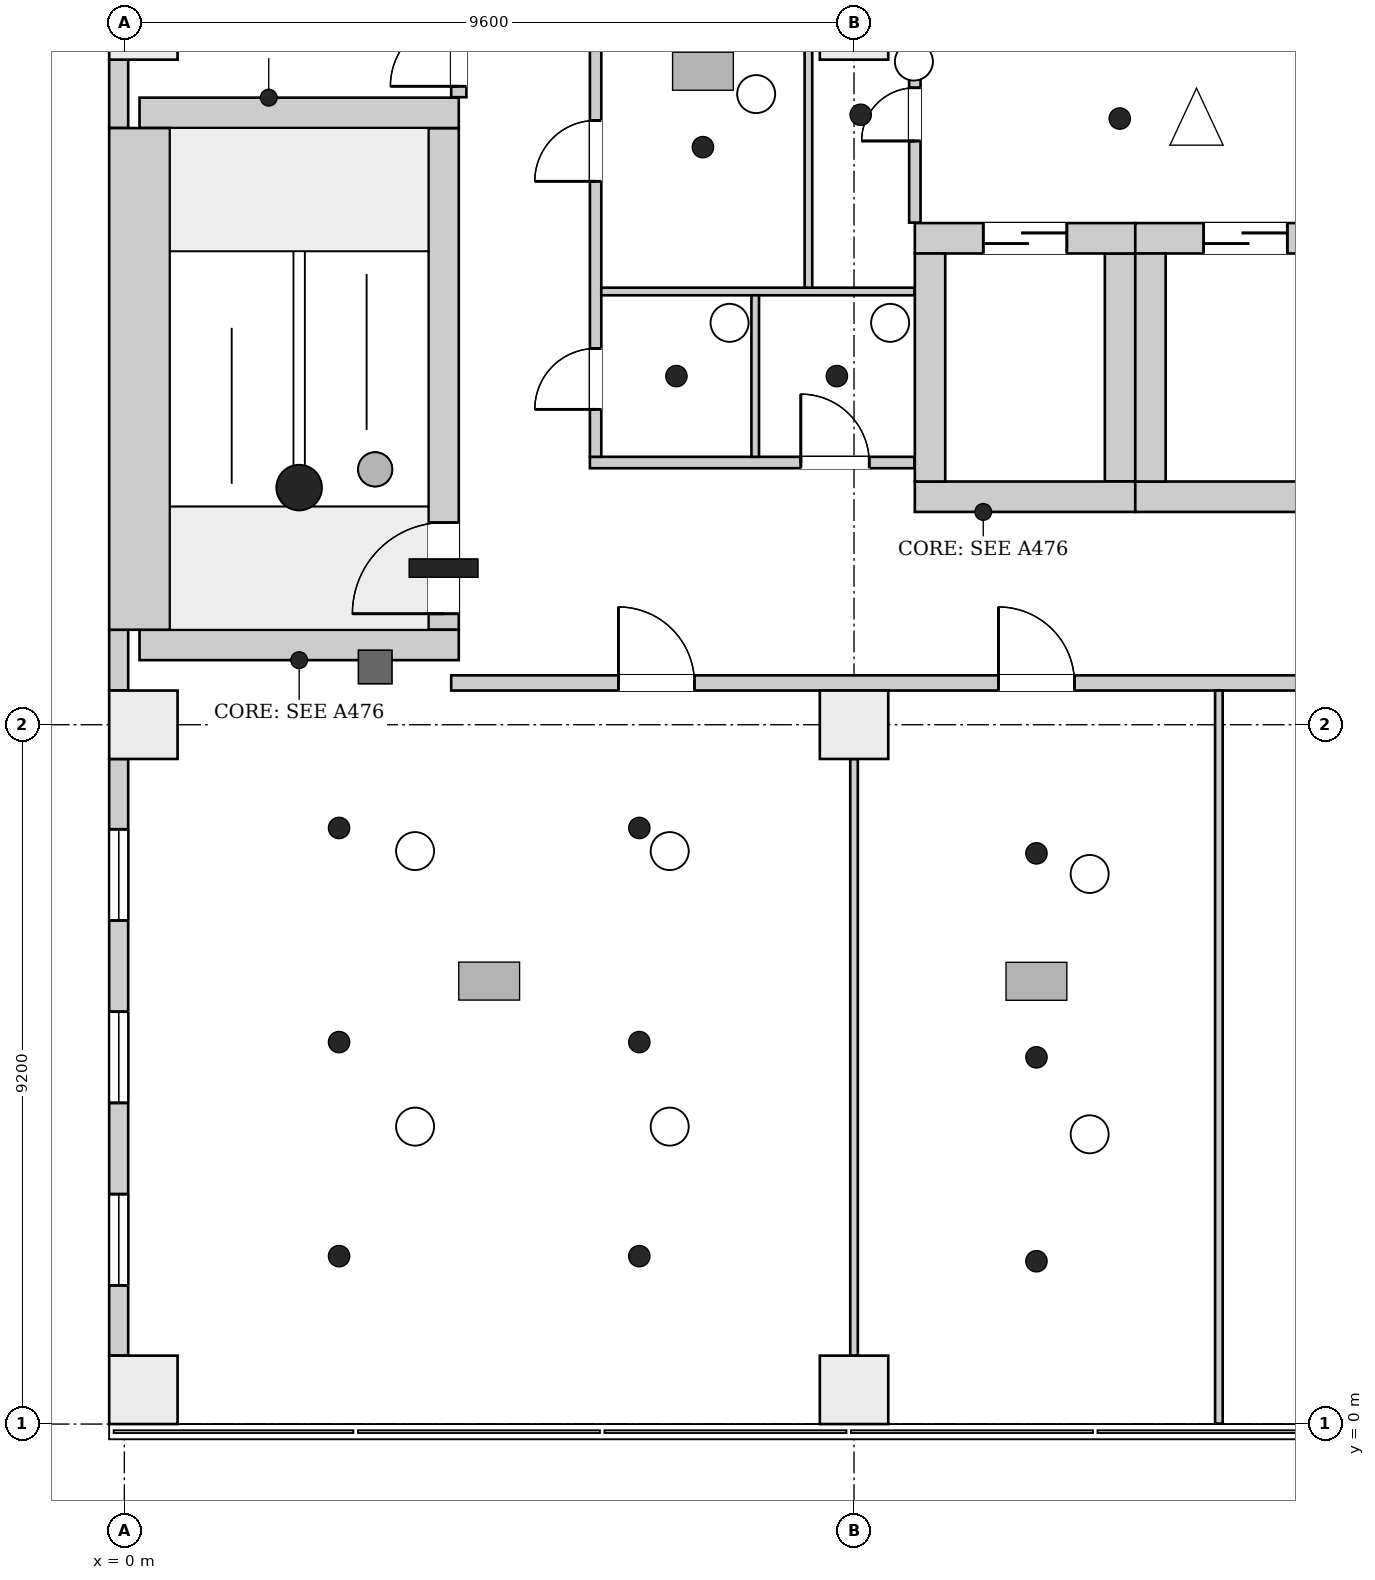
"""IFC4 building model, lengths in metres.
Left out: names, types, materials, properties, quantities, classifications, styles, units other than length and angle.
Written with IfcOpenShell. Run it as: python <this file> out.ifc"""

import sys

from ifc_helpers import new_model, si_unit, direction, frame, frame_2d, origin, origin_2d, place, context, subcontext, project, spatial, rectangle, extrude, element, fill, save


model = new_model("IFC4")
c1 = context("Model", 3, precision=1e-05, world=origin(), true_north=direction((0.0, 1.0)))
c2 = subcontext(c1, "Body", "Model", "MODEL_VIEW")
j1 = project(units=[si_unit("LENGTHUNIT", "METRE"), si_unit("PLANEANGLEUNIT", "RADIAN")], contexts=[c1])
p1 = place(None, origin())
s1 = spatial("IfcSite", under=j1, at=p1, CompositionType="ELEMENT")
p2 = place(p1, origin())
s2 = spatial("IfcBuilding", under=s1, at=p2, CompositionType="ELEMENT")
p3 = place(p2, frame((0.0, 0.0, 52.9)))
s3 = spatial("IfcBuildingStorey", under=s2, at=p3, CompositionType="ELEMENT", Elevation=52.9)
for number, where, z_axis, x_axis in (
    (1, (0.2, 10.25, 0.0), (0.0, 0.0, 1.0), (1.0, 0.0, 0.0)),
    (2, (0.2, 17.25, 0.0), (0.0, 0.0, 1.0), (1.0, 0.0, 0.0)),
):
    element("IfcWall", number, at=place(p3, frame(where, z_axis=z_axis, x_axis=x_axis)), inside=s3, PredefinedType="SHEAR", context=c2, shape_type="SweptSolid", body=[
        extrude(rectangle(XDim=4.2, YDim=0.4, at=frame_2d((2.1, 0.0))), origin(), (0.0, 0.0, 1.0), 4.2),
    ])
p4 = place(p3, frame((0.2, 10.45, 0.0), z_axis=(0.0, 0.0, 1.0), x_axis=(0.0, 1.0, 0.0)))
e3 = element("IfcWall", 3, at=p4, inside=s3, PredefinedType="SHEAR", context=c2, shape_type="SweptSolid", body=[
    extrude(rectangle(XDim=6.6, YDim=0.8, at=frame_2d((3.3, 0.0))), origin(), (0.0, 0.0, 1.0), 4.2),
])
p5 = place(p3, frame((4.2, 10.45, 0.0), z_axis=(0.0, 0.0, 1.0), x_axis=(0.0, 1.0, 0.0)))
e4 = element("IfcWall", 4, at=p5, inside=s3, PredefinedType="SHEAR", context=c2, shape_type="SweptSolid", body=[
    extrude(rectangle(XDim=6.6, YDim=0.4, at=frame_2d((3.3, 0.0))), origin(), (0.0, 0.0, 1.0), 4.2),
])
p6 = place(p5, frame((0.21, 0.0, 0.0)))
e5 = element("IfcOpeningElement", 5, at=p6, cuts=e4, PredefinedType="OPENING", context=c2, shape_type="SweptSolid", body=[
    extrude(rectangle(XDim=1.2, YDim=2.1, at=frame_2d((0.6, 1.05))), frame((0.0, 0.21, 0.0), z_axis=(0.0, -1.0, 0.0), x_axis=(1.0, 0.0, 0.0)), (0.0, 0.0, 1.0), 0.42),
])
p7 = place(p3, frame((10.4, 12.2, 0.0), z_axis=(0.0, 0.0, 1.0), x_axis=(1.0, 0.0, 0.0)))
e6 = element("IfcWall", 6, at=p7, inside=s3, PredefinedType="SHEAR", context=c2, shape_type="SweptSolid", body=[
    extrude(rectangle(XDim=2.9, YDim=0.4, at=frame_2d((1.45, 0.0))), origin(), (0.0, 0.0, 1.0), 4.2),
])
p8 = place(p3, frame((10.4, 15.6, 0.0), z_axis=(0.0, 0.0, 1.0), x_axis=(1.0, 0.0, 0.0)))
e7 = element("IfcWall", 7, at=p8, inside=s3, PredefinedType="SHEAR", context=c2, shape_type="SweptSolid", body=[
    extrude(rectangle(XDim=2.9, YDim=0.4, at=frame_2d((1.45, 0.0))), origin(), (0.0, 0.0, 1.0), 4.2),
])
p9 = place(p8, frame((0.9, 0.0, 0.0)))
e8 = element("IfcOpeningElement", 8, at=p9, cuts=e7, PredefinedType="OPENING", context=c2, shape_type="SweptSolid", body=[
    extrude(rectangle(XDim=1.1, YDim=2.1, at=frame_2d((0.55, 1.05))), frame((0.0, 0.21, 0.0), z_axis=(0.0, -1.0, 0.0), x_axis=(1.0, 0.0, 0.0)), (0.0, 0.0, 1.0), 0.42),
])
for number, where, z_axis, x_axis in (
    (9, (10.6, 12.4, 0.0), (0.0, 0.0, 1.0), (0.0, 1.0, 0.0)),
    (10, (13.1, 12.4, 0.0), (0.0, 0.0, 1.0), (0.0, 1.0, 0.0)),
):
    element("IfcWall", number, at=place(p3, frame(where, z_axis=z_axis, x_axis=x_axis)), inside=s3, PredefinedType="SHEAR", context=c2, shape_type="SweptSolid", body=[
        extrude(rectangle(XDim=3.0, YDim=0.4, at=frame_2d((1.5, 0.0))), origin(), (0.0, 0.0, 1.0), 4.2),
    ])
p10 = place(p3, frame((13.3, 12.2, 0.0), z_axis=(0.0, 0.0, 1.0), x_axis=(1.0, 0.0, 0.0)))
e11 = element("IfcWall", 11, at=p10, inside=s3, PredefinedType="SHEAR", context=c2, shape_type="SweptSolid", body=[
    extrude(rectangle(XDim=2.9, YDim=0.4, at=frame_2d((1.45, 0.0))), origin(), (0.0, 0.0, 1.0), 4.2),
])
p11 = place(p3, frame((13.3, 15.6, 0.0), z_axis=(0.0, 0.0, 1.0), x_axis=(1.0, 0.0, 0.0)))
e12 = element("IfcWall", 12, at=p11, inside=s3, PredefinedType="SHEAR", context=c2, shape_type="SweptSolid", body=[
    extrude(rectangle(XDim=2.9, YDim=0.4, at=frame_2d((1.45, 0.0))), origin(), (0.0, 0.0, 1.0), 4.2),
])
p12 = place(p11, frame((0.9, 0.0, 0.0)))
e13 = element("IfcOpeningElement", 13, at=p12, cuts=e12, PredefinedType="OPENING", context=c2, shape_type="SweptSolid", body=[
    extrude(rectangle(XDim=1.1, YDim=2.1, at=frame_2d((0.55, 1.05))), frame((0.0, 0.21, 0.0), z_axis=(0.0, -1.0, 0.0), x_axis=(1.0, 0.0, 0.0)), (0.0, 0.0, 1.0), 0.42),
])
p13 = place(p3, frame((13.5, 12.4, 0.0), z_axis=(0.0, 0.0, 1.0), x_axis=(0.0, 1.0, 0.0)))
e14 = element("IfcWall", 14, at=p13, inside=s3, PredefinedType="SHEAR", context=c2, shape_type="SweptSolid", body=[
    extrude(rectangle(XDim=3.0, YDim=0.4, at=frame_2d((1.5, 0.0))), origin(), (0.0, 0.0, 1.0), 4.2),
])
for number, where, z_axis, x_axis in (
    (15, (0.25, 0.45, 0.0), (0.0, 0.0, 1.0), (1.0, 0.0, 0.0)),
    (16, (9.6, 0.45, 0.0), (0.0, 0.0, 1.0), (1.0, 0.0, 0.0)),
    (17, (0.25, 9.2, 0.0), (0.0, 0.0, 1.0), (1.0, 0.0, 0.0)),
    (18, (9.6, 9.2, 0.0), (0.0, 0.0, 1.0), (1.0, 0.0, 0.0)),
    (19, (0.25, 18.4, 0.0), (0.0, 0.0, 1.0), (1.0, 0.0, 0.0)),
    (20, (9.6, 18.4, 0.0), (0.0, 0.0, 1.0), (1.0, 0.0, 0.0)),
):
    element("IfcColumn", number, at=place(p3, frame(where, z_axis=z_axis, x_axis=x_axis)), inside=s3, PredefinedType="COLUMN", context=c2, shape_type="SweptSolid", body=[
        extrude(rectangle(XDim=0.9, YDim=0.9, at=origin_2d()), origin(), (0.0, 0.0, 1.0), 4.2),
    ])
p14 = place(p3, frame((-0.074, 8.75, 0.0), z_axis=(0.0, 0.0, 1.0), x_axis=(0.0, -1.0, 0.0)))
e21 = element("IfcWall", 21, at=p14, inside=s3, PredefinedType="ELEMENTEDWALL", context=c2, shape_type="SweptSolid", body=[
    extrude(rectangle(XDim=7.85, YDim=0.25, at=frame_2d((3.925, 0.0))), origin(), (0.0, 0.0, 1.0), 3.9),
])
p15 = place(p14, frame((5.725, 0.0, 0.9)))
e22 = element("IfcOpeningElement", 22, at=p15, cuts=e21, PredefinedType="OPENING", context=c2, shape_type="SweptSolid", body=[
    extrude(rectangle(XDim=1.2, YDim=2.6, at=frame_2d((0.6, 1.3))), frame((0.0, 0.135, 0.0), z_axis=(0.0, -1.0, 0.0), x_axis=(1.0, 0.0, 0.0)), (0.0, 0.0, 1.0), 0.27),
])
p16 = place(p14, frame((3.325, 0.0, 0.9)))
e23 = element("IfcOpeningElement", 23, at=p16, cuts=e21, PredefinedType="OPENING", context=c2, shape_type="SweptSolid", body=[
    extrude(rectangle(XDim=1.2, YDim=2.6, at=frame_2d((0.6, 1.3))), frame((0.0, 0.135, 0.0), z_axis=(0.0, -1.0, 0.0), x_axis=(1.0, 0.0, 0.0)), (0.0, 0.0, 1.0), 0.27),
])
p17 = place(p14, frame((0.925, 0.0, 0.9)))
e24 = element("IfcOpeningElement", 24, at=p17, cuts=e21, PredefinedType="OPENING", context=c2, shape_type="SweptSolid", body=[
    extrude(rectangle(XDim=1.2, YDim=2.6, at=frame_2d((0.6, 1.3))), frame((0.0, 0.135, 0.0), z_axis=(0.0, -1.0, 0.0), x_axis=(1.0, 0.0, 0.0)), (0.0, 0.0, 1.0), 0.27),
])
p18 = place(p3, frame((-0.074, 10.45, 0.0), z_axis=(0.0, 0.0, 1.0), x_axis=(0.0, -1.0, 0.0)))
e25 = element("IfcWall", 25, at=p18, inside=s3, PredefinedType="ELEMENTEDWALL", context=c2, shape_type="SweptSolid", body=[
    extrude(rectangle(XDim=0.8, YDim=0.25, at=frame_2d((0.4, 0.0))), origin(), (0.0, 0.0, 1.0), 3.9),
])
p19 = place(p3, frame((-0.074, 17.95, 0.0), z_axis=(0.0, 0.0, 1.0), x_axis=(0.0, -1.0, 0.0)))
e26 = element("IfcWall", 26, at=p19, inside=s3, PredefinedType="ELEMENTEDWALL", context=c2, shape_type="SweptSolid", body=[
    extrude(rectangle(XDim=0.9, YDim=0.25, at=frame_2d((0.45, 0.0))), origin(), (0.0, 0.0, 1.0), 3.9),
])
p20 = place(p3, frame((4.3, 9.75, 0.0), z_axis=(0.0, 0.0, 1.0), x_axis=(1.0, 0.0, 0.0)))
e27 = element("IfcWall", 27, at=p20, inside=s3, PredefinedType="PARTITIONING", context=c2, shape_type="SweptSolid", body=[
    extrude(rectangle(XDim=43.894, YDim=0.2, at=frame_2d((21.947, 0.0))), origin(), (0.0, 0.0, 1.0), 3.9),
])
p21 = place(p20, frame((2.2, 0.0, 0.0)))
e28 = element("IfcOpeningElement", 28, at=p21, cuts=e27, PredefinedType="OPENING", context=c2, shape_type="SweptSolid", body=[
    extrude(rectangle(XDim=1.0, YDim=2.1, at=frame_2d((0.5, 1.05))), frame((0.0, 0.11, 0.0), z_axis=(0.0, -1.0, 0.0), x_axis=(1.0, 0.0, 0.0)), (0.0, 0.0, 1.0), 0.22),
])
p22 = place(p20, frame((7.2, 0.0, 0.0)))
e29 = element("IfcOpeningElement", 29, at=p22, cuts=e27, PredefinedType="OPENING", context=c2, shape_type="SweptSolid", body=[
    extrude(rectangle(XDim=1.0, YDim=2.1, at=frame_2d((0.5, 1.05))), frame((0.0, 0.11, 0.0), z_axis=(0.0, -1.0, 0.0), x_axis=(1.0, 0.0, 0.0)), (0.0, 0.0, 1.0), 0.22),
])
p23 = place(p20, frame((16.8, 0.0, 0.0)))
e30 = element("IfcOpeningElement", 30, at=p23, cuts=e27, PredefinedType="OPENING", context=c2, shape_type="SweptSolid", body=[
    extrude(rectangle(XDim=1.0, YDim=2.1, at=frame_2d((0.5, 1.05))), frame((0.0, 0.11, 0.0), z_axis=(0.0, -1.0, 0.0), x_axis=(1.0, 0.0, 0.0)), (0.0, 0.0, 1.0), 0.22),
])
p24 = place(p20, frame((28.8, 0.0, 0.0)))
e31 = element("IfcOpeningElement", 31, at=p24, cuts=e27, PredefinedType="OPENING", context=c2, shape_type="SweptSolid", body=[
    extrude(rectangle(XDim=1.0, YDim=2.1, at=frame_2d((0.5, 1.05))), frame((0.0, 0.11, 0.0), z_axis=(0.0, -1.0, 0.0), x_axis=(1.0, 0.0, 0.0)), (0.0, 0.0, 1.0), 0.22),
])
p25 = place(p20, frame((38.25, 0.0, 0.0)))
e32 = element("IfcOpeningElement", 32, at=p25, cuts=e27, PredefinedType="OPENING", context=c2, shape_type="SweptSolid", body=[
    extrude(rectangle(XDim=1.5, YDim=2.1, at=frame_2d((0.75, 1.05))), frame((0.0, 0.11, 0.0), z_axis=(0.0, -1.0, 0.0), x_axis=(1.0, 0.0, 0.0)), (0.0, 0.0, 1.0), 0.22),
])
p26 = place(p3, frame((4.4, 17.456, 0.0), z_axis=(0.0, 0.0, 1.0), x_axis=(0.0, 1.0, 0.0)))
e33 = element("IfcWall", 33, at=p26, inside=s3, PredefinedType="PARTITIONING", context=c2, shape_type="SweptSolid", body=[
    extrude(rectangle(XDim=1.188, YDim=0.2, at=frame_2d((0.594, 0.0))), origin(), (0.0, 0.0, 1.0), 3.9),
])
p27 = place(p26, frame((0.144, 0.0, 0.0)))
e34 = element("IfcOpeningElement", 34, at=p27, cuts=e33, PredefinedType="OPENING", context=c2, shape_type="SweptSolid", body=[
    extrude(rectangle(XDim=0.9, YDim=2.1, at=frame_2d((0.45, 1.05))), frame((0.0, 0.11, 0.0), z_axis=(0.0, -1.0, 0.0), x_axis=(1.0, 0.0, 0.0)), (0.0, 0.0, 1.0), 0.22),
])
p28 = place(p3, frame((6.125, 12.65, 0.0), z_axis=(0.0, 0.0, 1.0), x_axis=(1.0, 0.0, 0.0)))
e35 = element("IfcWall", 35, at=p28, inside=s3, PredefinedType="PARTITIONING", context=c2, shape_type="SweptSolid", body=[
    extrude(rectangle(XDim=4.269, YDim=0.15, at=frame_2d((2.135, 0.0))), origin(), (0.0, 0.0, 1.0), 3.9),
])
p29 = place(p28, frame((2.775, 0.0, 0.0)))
e36 = element("IfcOpeningElement", 36, at=p29, cuts=e35, PredefinedType="OPENING", context=c2, shape_type="SweptSolid", body=[
    extrude(rectangle(XDim=0.9, YDim=2.1, at=frame_2d((0.45, 1.05))), frame((0.0, 0.085, 0.0), z_axis=(0.0, -1.0, 0.0), x_axis=(1.0, 0.0, 0.0)), (0.0, 0.0, 1.0), 0.17),
])
p30 = place(p3, frame((6.2, 12.725, 0.0), z_axis=(0.0, 0.0, 1.0), x_axis=(0.0, 1.0, 0.0)))
e37 = element("IfcWall", 37, at=p30, inside=s3, PredefinedType="PARTITIONING", context=c2, shape_type="SweptSolid", body=[
    extrude(rectangle(XDim=5.919, YDim=0.15, at=frame_2d((2.959, 0.0))), origin(), (0.0, 0.0, 1.0), 3.9),
])
p31 = place(p30, frame((0.625, 0.0, 0.0)))
e38 = element("IfcOpeningElement", 38, at=p31, cuts=e37, PredefinedType="OPENING", context=c2, shape_type="SweptSolid", body=[
    extrude(rectangle(XDim=0.8, YDim=2.1, at=frame_2d((0.4, 1.05))), frame((0.0, 0.085, 0.0), z_axis=(0.0, -1.0, 0.0), x_axis=(1.0, 0.0, 0.0)), (0.0, 0.0, 1.0), 0.17),
])
p32 = place(p30, frame((3.625, 0.0, 0.0)))
e39 = element("IfcOpeningElement", 39, at=p32, cuts=e37, PredefinedType="OPENING", context=c2, shape_type="SweptSolid", body=[
    extrude(rectangle(XDim=0.8, YDim=2.1, at=frame_2d((0.4, 1.05))), frame((0.0, 0.085, 0.0), z_axis=(0.0, -1.0, 0.0), x_axis=(1.0, 0.0, 0.0)), (0.0, 0.0, 1.0), 0.17),
])
p33 = place(p3, frame((6.275, 14.9, 0.0), z_axis=(0.0, 0.0, 1.0), x_axis=(1.0, 0.0, 0.0)))
e40 = element("IfcWall", 40, at=p33, inside=s3, PredefinedType="PARTITIONING", context=c2, shape_type="SweptSolid", body=[
    extrude(rectangle(XDim=4.119, YDim=0.1, at=frame_2d((2.06, 0.0))), origin(), (0.0, 0.0, 1.0), 3.9),
])
p34 = place(p3, frame((8.3, 12.725, 0.0), z_axis=(0.0, 0.0, 1.0), x_axis=(0.0, 1.0, 0.0)))
e41 = element("IfcWall", 41, at=p34, inside=s3, PredefinedType="PARTITIONING", context=c2, shape_type="SweptSolid", body=[
    extrude(rectangle(XDim=2.125, YDim=0.1, at=frame_2d((1.062, 0.0))), origin(), (0.0, 0.0, 1.0), 3.9),
])
p35 = place(p3, frame((9.0, 14.95, 0.0), z_axis=(0.0, 0.0, 1.0), x_axis=(0.0, 1.0, 0.0)))
e42 = element("IfcWall", 42, at=p35, inside=s3, PredefinedType="PARTITIONING", context=c2, shape_type="SweptSolid", body=[
    extrude(rectangle(XDim=3.694, YDim=0.1, at=frame_2d((1.847, 0.0))), origin(), (0.0, 0.0, 1.0), 3.9),
])
p36 = place(p3, frame((9.6, 0.9, 0.0), z_axis=(0.0, 0.0, 1.0), x_axis=(0.0, 1.0, 0.0)))
e43 = element("IfcWall", 43, at=p36, inside=s3, PredefinedType="PARTITIONING", context=c2, shape_type="SweptSolid", body=[
    extrude(rectangle(XDim=7.85, YDim=0.1, at=frame_2d((3.925, 0.0))), origin(), (0.0, 0.0, 1.0), 3.9),
])
p37 = place(p3, frame((10.4, 15.806, 0.0), z_axis=(0.0, 0.0, 1.0), x_axis=(0.0, 1.0, 0.0)))
e44 = element("IfcWall", 44, at=p37, inside=s3, PredefinedType="PARTITIONING", context=c2, shape_type="SweptSolid", body=[
    extrude(rectangle(XDim=2.838, YDim=0.15, at=frame_2d((1.419, 0.0))), origin(), (0.0, 0.0, 1.0), 3.9),
])
p38 = place(p37, frame((1.074, 0.0, 0.0)))
e45 = element("IfcOpeningElement", 45, at=p38, cuts=e44, PredefinedType="OPENING", context=c2, shape_type="SweptSolid", body=[
    extrude(rectangle(XDim=0.7, YDim=2.1, at=frame_2d((0.35, 1.05))), frame((0.0, 0.085, 0.0), z_axis=(0.0, -1.0, 0.0), x_axis=(1.0, 0.0, 0.0)), (0.0, 0.0, 1.0), 0.17),
])
p39 = place(p3, frame((14.4, 0.006, 0.0), z_axis=(0.0, 0.0, 1.0), x_axis=(0.0, 1.0, 0.0)))
e46 = element("IfcWall", 46, at=p39, inside=s3, PredefinedType="PARTITIONING", context=c2, shape_type="SweptSolid", body=[
    extrude(rectangle(XDim=9.644, YDim=0.1, at=frame_2d((4.822, 0.0))), origin(), (0.0, 0.0, 1.0), 3.9),
])
p40 = place(p15, origin())
e47 = element("IfcWindow", 47, at=p40, inside=s3, PartitioningType="SINGLE_PANEL", PredefinedType="WINDOW", context=c2, shape_type="SweptSolid", body=[
    extrude(rectangle(XDim=1.2, YDim=2.6, at=frame_2d((0.6, 1.3))), frame((0.0, 0.03, 0.0), z_axis=(0.0, -1.0, 0.0), x_axis=(1.0, 0.0, 0.0)), (0.0, 0.0, 1.0), 0.06),
])
fill(e22, e47)
p41 = place(p16, origin())
e48 = element("IfcWindow", 48, at=p41, inside=s3, PartitioningType="SINGLE_PANEL", PredefinedType="WINDOW", context=c2, shape_type="SweptSolid", body=[
    extrude(rectangle(XDim=1.2, YDim=2.6, at=frame_2d((0.6, 1.3))), frame((0.0, 0.03, 0.0), z_axis=(0.0, -1.0, 0.0), x_axis=(1.0, 0.0, 0.0)), (0.0, 0.0, 1.0), 0.06),
])
fill(e23, e48)
p42 = place(p17, origin())
e49 = element("IfcWindow", 49, at=p42, inside=s3, PartitioningType="SINGLE_PANEL", PredefinedType="WINDOW", context=c2, shape_type="SweptSolid", body=[
    extrude(rectangle(XDim=1.2, YDim=2.6, at=frame_2d((0.6, 1.3))), frame((0.0, 0.03, 0.0), z_axis=(0.0, -1.0, 0.0), x_axis=(1.0, 0.0, 0.0)), (0.0, 0.0, 1.0), 0.06),
])
fill(e24, e49)
p43 = place(p6, origin())
e50 = element("IfcDoor", 50, at=p43, inside=s3, OperationType="SINGLE_SWING_RIGHT", PredefinedType="DOOR", context=c2, shape_type="SweptSolid", body=[
    extrude(rectangle(XDim=1.2, YDim=2.1, at=frame_2d((0.6, 1.05))), frame((0.0, 0.025, 0.0), z_axis=(0.0, -1.0, 0.0), x_axis=(1.0, 0.0, 0.0)), (0.0, 0.0, 1.0), 0.05),
])
fill(e5, e50)
p44 = place(p9, origin())
e51 = element("IfcDoor", 51, at=p44, inside=s3, OperationType="DOUBLE_DOOR_SLIDING", PredefinedType="DOOR", context=c2, shape_type="SweptSolid", body=[
    extrude(rectangle(XDim=1.1, YDim=2.1, at=frame_2d((0.55, 1.05))), frame((0.0, 0.025, 0.0), z_axis=(0.0, -1.0, 0.0), x_axis=(1.0, 0.0, 0.0)), (0.0, 0.0, 1.0), 0.05),
])
fill(e8, e51)
p45 = place(p12, origin())
e52 = element("IfcDoor", 52, at=p45, inside=s3, OperationType="DOUBLE_DOOR_SLIDING", PredefinedType="DOOR", context=c2, shape_type="SweptSolid", body=[
    extrude(rectangle(XDim=1.1, YDim=2.1, at=frame_2d((0.55, 1.05))), frame((0.0, 0.025, 0.0), z_axis=(0.0, -1.0, 0.0), x_axis=(1.0, 0.0, 0.0)), (0.0, 0.0, 1.0), 0.05),
])
fill(e13, e52)
p46 = place(p27, origin())
e53 = element("IfcDoor", 53, at=p46, inside=s3, OperationType="SINGLE_SWING_LEFT", PredefinedType="DOOR", context=c2, shape_type="SweptSolid", body=[
    extrude(rectangle(XDim=0.9, YDim=2.1, at=frame_2d((0.45, 1.05))), frame((0.0, 0.025, 0.0), z_axis=(0.0, -1.0, 0.0), x_axis=(1.0, 0.0, 0.0)), (0.0, 0.0, 1.0), 0.05),
])
fill(e34, e53)
p47 = place(p31, origin())
e54 = element("IfcDoor", 54, at=p47, inside=s3, OperationType="SINGLE_SWING_LEFT", PredefinedType="DOOR", context=c2, shape_type="SweptSolid", body=[
    extrude(rectangle(XDim=0.8, YDim=2.1, at=frame_2d((0.4, 1.05))), frame((0.0, 0.025, 0.0), z_axis=(0.0, -1.0, 0.0), x_axis=(1.0, 0.0, 0.0)), (0.0, 0.0, 1.0), 0.05),
])
fill(e38, e54)
p48 = place(p29, origin())
e55 = element("IfcDoor", 55, at=p48, inside=s3, OperationType="SINGLE_SWING_RIGHT", PredefinedType="DOOR", context=c2, shape_type="SweptSolid", body=[
    extrude(rectangle(XDim=0.9, YDim=2.1, at=frame_2d((0.45, 1.05))), frame((0.0, 0.025, 0.0), z_axis=(0.0, -1.0, 0.0), x_axis=(1.0, 0.0, 0.0)), (0.0, 0.0, 1.0), 0.05),
])
fill(e36, e55)
p49 = place(p32, origin())
e56 = element("IfcDoor", 56, at=p49, inside=s3, OperationType="SINGLE_SWING_LEFT", PredefinedType="DOOR", context=c2, shape_type="SweptSolid", body=[
    extrude(rectangle(XDim=0.8, YDim=2.1, at=frame_2d((0.4, 1.05))), frame((0.0, 0.025, 0.0), z_axis=(0.0, -1.0, 0.0), x_axis=(1.0, 0.0, 0.0)), (0.0, 0.0, 1.0), 0.05),
])
fill(e39, e56)
p50 = place(p38, origin())
e57 = element("IfcDoor", 57, at=p50, inside=s3, OperationType="SINGLE_SWING_LEFT", PredefinedType="DOOR", context=c2, shape_type="SweptSolid", body=[
    extrude(rectangle(XDim=0.7, YDim=2.1, at=frame_2d((0.35, 1.05))), frame((0.0, 0.025, 0.0), z_axis=(0.0, -1.0, 0.0), x_axis=(1.0, 0.0, 0.0)), (0.0, 0.0, 1.0), 0.05),
])
fill(e45, e57)
p51 = place(p21, origin())
e58 = element("IfcDoor", 58, at=p51, inside=s3, OperationType="SINGLE_SWING_RIGHT", PredefinedType="DOOR", context=c2, shape_type="SweptSolid", body=[
    extrude(rectangle(XDim=1.0, YDim=2.1, at=frame_2d((0.5, 1.05))), frame((0.0, 0.025, 0.0), z_axis=(0.0, -1.0, 0.0), x_axis=(1.0, 0.0, 0.0)), (0.0, 0.0, 1.0), 0.05),
])
fill(e28, e58)
p52 = place(p22, origin())
e59 = element("IfcDoor", 59, at=p52, inside=s3, OperationType="SINGLE_SWING_LEFT", PredefinedType="DOOR", context=c2, shape_type="SweptSolid", body=[
    extrude(rectangle(XDim=1.0, YDim=2.1, at=frame_2d((0.5, 1.05))), frame((0.0, 0.025, 0.0), z_axis=(0.0, -1.0, 0.0), x_axis=(1.0, 0.0, 0.0)), (0.0, 0.0, 1.0), 0.05),
])
fill(e29, e59)
save(model, sys.argv[1])
